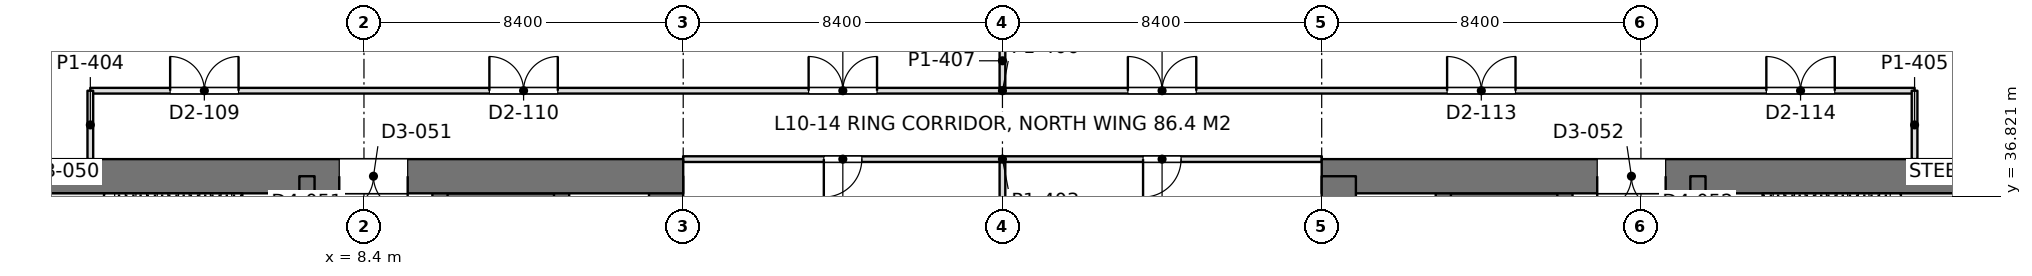
"""IFC4 building model, lengths in metres.
Left out: names, types, materials, properties, quantities, classifications, styles, units other than length and angle.
Written with IfcOpenShell. Run it as: python <this file> out.ifc"""

import sys

from ifc_helpers import new_model, si_unit, direction, frame, frame_2d, origin, place, context, subcontext, project, spatial, rectangle, extrude, element, fill, save


model = new_model("IFC4")
c1 = context("Model", 3, precision=1e-05, world=origin(), true_north=direction((0.0, 1.0)))
c2 = subcontext(c1, "Body", "Model", "MODEL_VIEW")
j1 = project(units=[si_unit("LENGTHUNIT", "METRE"), si_unit("PLANEANGLEUNIT", "RADIAN")], contexts=[c1])
p1 = place(None, origin())
s1 = spatial("IfcSite", under=j1, at=p1, CompositionType="ELEMENT")
p2 = place(p1, origin())
s2 = spatial("IfcBuilding", under=s1, at=p2, CompositionType="ELEMENT")
p3 = place(p2, frame((0.0, 0.0, 45.9)))
s3 = spatial("IfcBuildingStorey", under=s2, at=p3, CompositionType="ELEMENT", Elevation=45.9)
p4 = place(p3, frame((-1.2, 37.35, 0.0), z_axis=(0.0, 0.0, 1.0), x_axis=(1.0, 0.0, 0.0)))
e1 = element("IfcWall", 1, at=p4, inside=s3, PredefinedType="SHEAR", context=c2, shape_type="SweptSolid", body=[
    extrude(rectangle(XDim=18.0, YDim=0.9, at=frame_2d((9.0, 0.0))), origin(), (0.0, 0.0, 1.0), 4.5),
])
p5 = place(p4, frame((8.95, 0.0, 0.0)))
e2 = element("IfcOpeningElement", 2, at=p5, cuts=e1, PredefinedType="OPENING", context=c2, shape_type="SweptSolid", body=[
    extrude(rectangle(XDim=1.8, YDim=2.4, at=frame_2d((0.9, 1.2))), frame((0.0, 0.46, 0.0), z_axis=(0.0, -1.0, 0.0), x_axis=(1.0, 0.0, 0.0)), (0.0, 0.0, 1.0), 0.92),
])
p6 = place(p3, frame((16.35, 13.05, 0.0), z_axis=(0.0, 0.0, 1.0), x_axis=(0.0, 1.0, 0.0)))
e3 = element("IfcWall", 3, at=p6, inside=s3, PredefinedType="SHEAR", context=c2, shape_type="SweptSolid", body=[
    extrude(rectangle(XDim=24.3, YDim=0.9, at=frame_2d((12.15, 0.0))), origin(), (0.0, 0.0, 1.0), 4.5),
])
p7 = place(p3, frame((6.9, 13.05, 0.0), z_axis=(0.0, 0.0, 1.0), x_axis=(0.0, 1.0, 0.0)))
e4 = element("IfcWall", 4, at=p7, inside=s3, PredefinedType="SHEAR", context=c2, shape_type="SweptSolid", body=[
    extrude(rectangle(XDim=24.3, YDim=0.4, at=frame_2d((12.15, 0.0))), origin(), (0.0, 0.0, 1.0), 4.5),
])
p8 = place(p7, frame((1.3, 0.0, 0.0)))
e5 = element("IfcOpeningElement", 5, at=p8, cuts=e4, PredefinedType="OPENING", context=c2, shape_type="SweptSolid", body=[
    extrude(rectangle(XDim=1.0, YDim=2.2, at=frame_2d((0.5, 1.1))), frame((0.0, 0.21, 0.0), z_axis=(0.0, -1.0, 0.0), x_axis=(1.0, 0.0, 0.0)), (0.0, 0.0, 1.0), 0.42),
])
p9 = place(p7, frame((22.0, 0.0, 0.0)))
e6 = element("IfcOpeningElement", 6, at=p9, cuts=e4, PredefinedType="OPENING", context=c2, shape_type="SweptSolid", body=[
    extrude(rectangle(XDim=1.0, YDim=2.2, at=frame_2d((0.5, 1.1))), frame((0.0, 0.21, 0.0), z_axis=(0.0, -1.0, 0.0), x_axis=(1.0, 0.0, 0.0)), (0.0, 0.0, 1.0), 0.42),
])
p10 = place(p7, frame((5.55, 0.0, 0.0)))
e7 = element("IfcOpeningElement", 7, at=p10, cuts=e4, PredefinedType="OPENING", context=c2, shape_type="SweptSolid", body=[
    extrude(rectangle(XDim=1.0, YDim=2.2, at=frame_2d((0.5, 1.1))), frame((0.0, 0.21, 0.0), z_axis=(0.0, -1.0, 0.0), x_axis=(1.0, 0.0, 0.0)), (0.0, 0.0, 1.0), 0.42),
])
p11 = place(p7, frame((9.55, 0.0, 0.0)))
e8 = element("IfcOpeningElement", 8, at=p11, cuts=e4, PredefinedType="OPENING", context=c2, shape_type="SweptSolid", body=[
    extrude(rectangle(XDim=1.0, YDim=2.2, at=frame_2d((0.5, 1.1))), frame((0.0, 0.21, 0.0), z_axis=(0.0, -1.0, 0.0), x_axis=(1.0, 0.0, 0.0)), (0.0, 0.0, 1.0), 0.42),
])
p12 = place(p7, frame((12.8, 0.0, 0.0)))
e9 = element("IfcOpeningElement", 9, at=p12, cuts=e4, PredefinedType="OPENING", context=c2, shape_type="SweptSolid", body=[
    extrude(rectangle(XDim=1.1, YDim=2.2, at=frame_2d((0.55, 1.1))), frame((0.0, 0.21, 0.0), z_axis=(0.0, -1.0, 0.0), x_axis=(1.0, 0.0, 0.0)), (0.0, 0.0, 1.0), 0.42),
])
p13 = place(p7, frame((15.538, 0.0, 0.0)))
e10 = element("IfcOpeningElement", 10, at=p13, cuts=e4, PredefinedType="OPENING", context=c2, shape_type="SweptSolid", body=[
    extrude(rectangle(XDim=1.1, YDim=2.2, at=frame_2d((0.55, 1.1))), frame((0.0, 0.21, 0.0), z_axis=(0.0, -1.0, 0.0), x_axis=(1.0, 0.0, 0.0)), (0.0, 0.0, 1.0), 0.42),
])
p14 = place(p7, frame((18.262, 0.0, 0.0)))
e11 = element("IfcOpeningElement", 11, at=p14, cuts=e4, PredefinedType="OPENING", context=c2, shape_type="SweptSolid", body=[
    extrude(rectangle(XDim=1.1, YDim=2.2, at=frame_2d((0.55, 1.1))), frame((0.0, 0.21, 0.0), z_axis=(0.0, -1.0, 0.0), x_axis=(1.0, 0.0, 0.0)), (0.0, 0.0, 1.0), 0.42),
])
p15 = place(p3, frame((10.4, 13.05, 0.0), z_axis=(0.0, 0.0, 1.0), x_axis=(0.0, 1.0, 0.0)))
e12 = element("IfcWall", 12, at=p15, inside=s3, PredefinedType="SHEAR", context=c2, shape_type="SweptSolid", body=[
    extrude(rectangle(XDim=24.3, YDim=0.4, at=frame_2d((12.15, 0.0))), origin(), (0.0, 0.0, 1.0), 4.5),
])
p16 = place(p15, frame((1.5, 0.0, 0.0)))
e13 = element("IfcOpeningElement", 13, at=p16, cuts=e12, PredefinedType="OPENING", context=c2, shape_type="SweptSolid", body=[
    extrude(rectangle(XDim=1.1, YDim=2.2, at=frame_2d((0.55, 1.1))), frame((0.0, 0.21, 0.0), z_axis=(0.0, -1.0, 0.0), x_axis=(1.0, 0.0, 0.0)), (0.0, 0.0, 1.0), 0.42),
])
p17 = place(p15, frame((4.35, 0.0, 0.0)))
e14 = element("IfcOpeningElement", 14, at=p17, cuts=e12, PredefinedType="OPENING", context=c2, shape_type="SweptSolid", body=[
    extrude(rectangle(XDim=1.1, YDim=2.2, at=frame_2d((0.55, 1.1))), frame((0.0, 0.21, 0.0), z_axis=(0.0, -1.0, 0.0), x_axis=(1.0, 0.0, 0.0)), (0.0, 0.0, 1.0), 0.42),
])
p18 = place(p15, frame((7.2, 0.0, 0.0)))
e15 = element("IfcOpeningElement", 15, at=p18, cuts=e12, PredefinedType="OPENING", context=c2, shape_type="SweptSolid", body=[
    extrude(rectangle(XDim=1.1, YDim=2.2, at=frame_2d((0.55, 1.1))), frame((0.0, 0.21, 0.0), z_axis=(0.0, -1.0, 0.0), x_axis=(1.0, 0.0, 0.0)), (0.0, 0.0, 1.0), 0.42),
])
p19 = place(p15, frame((21.45, 0.0, 0.0)))
e16 = element("IfcOpeningElement", 16, at=p19, cuts=e12, PredefinedType="OPENING", context=c2, shape_type="SweptSolid", body=[
    extrude(rectangle(XDim=1.1, YDim=2.2, at=frame_2d((0.55, 1.1))), frame((0.0, 0.21, 0.0), z_axis=(0.0, -1.0, 0.0), x_axis=(1.0, 0.0, 0.0)), (0.0, 0.0, 1.0), 0.42),
])
p20 = place(p3, frame((13.6, 13.05, 0.0), z_axis=(0.0, 0.0, 1.0), x_axis=(0.0, 1.0, 0.0)))
e17 = element("IfcWall", 17, at=p20, inside=s3, PredefinedType="SHEAR", context=c2, shape_type="SweptSolid", body=[
    extrude(rectangle(XDim=24.3, YDim=0.4, at=frame_2d((12.15, 0.0))), origin(), (0.0, 0.0, 1.0), 4.5),
])
p21 = place(p3, frame((10.4, 36.625, 0.0), z_axis=(0.0, 0.0, 1.0), x_axis=(1.0, 0.0, 0.0)))
e18 = element("IfcWall", 18, at=p21, inside=s3, PredefinedType="SHEAR", context=c2, shape_type="SweptSolid", body=[
    extrude(rectangle(XDim=3.2, YDim=0.55, at=frame_2d((1.6, 0.0))), origin(), (0.0, 0.0, 1.0), 4.5),
])
p22 = place(p3, frame((33.6, 37.35, 0.0), z_axis=(0.0, 0.0, 1.0), x_axis=(1.0, 0.0, 0.0)))
e19 = element("IfcWall", 19, at=p22, inside=s3, PredefinedType="SHEAR", context=c2, shape_type="SweptSolid", body=[
    extrude(rectangle(XDim=18.0, YDim=0.9, at=frame_2d((9.0, 0.0))), origin(), (0.0, 0.0, 1.0), 4.5),
])
p23 = place(p22, frame((7.25, 0.0, 0.0)))
e20 = element("IfcOpeningElement", 20, at=p23, cuts=e19, PredefinedType="OPENING", context=c2, shape_type="SweptSolid", body=[
    extrude(rectangle(XDim=1.8, YDim=2.4, at=frame_2d((0.9, 1.2))), frame((0.0, 0.46, 0.0), z_axis=(0.0, -1.0, 0.0), x_axis=(1.0, 0.0, 0.0)), (0.0, 0.0, 1.0), 0.92),
])
p24 = place(p3, frame((34.05, 13.05, 0.0), z_axis=(0.0, 0.0, 1.0), x_axis=(0.0, 1.0, 0.0)))
e21 = element("IfcWall", 21, at=p24, inside=s3, PredefinedType="SHEAR", context=c2, shape_type="SweptSolid", body=[
    extrude(rectangle(XDim=24.3, YDim=0.9, at=frame_2d((12.15, 0.0))), origin(), (0.0, 0.0, 1.0), 4.5),
])
p25 = place(p3, frame((43.5, 13.05, 0.0), z_axis=(0.0, 0.0, 1.0), x_axis=(0.0, 1.0, 0.0)))
e22 = element("IfcWall", 22, at=p25, inside=s3, PredefinedType="SHEAR", context=c2, shape_type="SweptSolid", body=[
    extrude(rectangle(XDim=24.3, YDim=0.4, at=frame_2d((12.15, 0.0))), origin(), (0.0, 0.0, 1.0), 4.5),
])
p26 = place(p25, frame((1.3, 0.0, 0.0)))
e23 = element("IfcOpeningElement", 23, at=p26, cuts=e22, PredefinedType="OPENING", context=c2, shape_type="SweptSolid", body=[
    extrude(rectangle(XDim=1.0, YDim=2.2, at=frame_2d((0.5, 1.1))), frame((0.0, 0.21, 0.0), z_axis=(0.0, -1.0, 0.0), x_axis=(1.0, 0.0, 0.0)), (0.0, 0.0, 1.0), 0.42),
])
p27 = place(p25, frame((22.0, 0.0, 0.0)))
e24 = element("IfcOpeningElement", 24, at=p27, cuts=e22, PredefinedType="OPENING", context=c2, shape_type="SweptSolid", body=[
    extrude(rectangle(XDim=1.0, YDim=2.2, at=frame_2d((0.5, 1.1))), frame((0.0, 0.21, 0.0), z_axis=(0.0, -1.0, 0.0), x_axis=(1.0, 0.0, 0.0)), (0.0, 0.0, 1.0), 0.42),
])
p28 = place(p25, frame((5.55, 0.0, 0.0)))
e25 = element("IfcOpeningElement", 25, at=p28, cuts=e22, PredefinedType="OPENING", context=c2, shape_type="SweptSolid", body=[
    extrude(rectangle(XDim=1.0, YDim=2.2, at=frame_2d((0.5, 1.1))), frame((0.0, 0.21, 0.0), z_axis=(0.0, -1.0, 0.0), x_axis=(1.0, 0.0, 0.0)), (0.0, 0.0, 1.0), 0.42),
])
p29 = place(p25, frame((9.55, 0.0, 0.0)))
e26 = element("IfcOpeningElement", 26, at=p29, cuts=e22, PredefinedType="OPENING", context=c2, shape_type="SweptSolid", body=[
    extrude(rectangle(XDim=1.0, YDim=2.2, at=frame_2d((0.5, 1.1))), frame((0.0, 0.21, 0.0), z_axis=(0.0, -1.0, 0.0), x_axis=(1.0, 0.0, 0.0)), (0.0, 0.0, 1.0), 0.42),
])
p30 = place(p25, frame((12.8, 0.0, 0.0)))
e27 = element("IfcOpeningElement", 27, at=p30, cuts=e22, PredefinedType="OPENING", context=c2, shape_type="SweptSolid", body=[
    extrude(rectangle(XDim=1.1, YDim=2.2, at=frame_2d((0.55, 1.1))), frame((0.0, 0.21, 0.0), z_axis=(0.0, -1.0, 0.0), x_axis=(1.0, 0.0, 0.0)), (0.0, 0.0, 1.0), 0.42),
])
p31 = place(p25, frame((15.538, 0.0, 0.0)))
e28 = element("IfcOpeningElement", 28, at=p31, cuts=e22, PredefinedType="OPENING", context=c2, shape_type="SweptSolid", body=[
    extrude(rectangle(XDim=1.1, YDim=2.2, at=frame_2d((0.55, 1.1))), frame((0.0, 0.21, 0.0), z_axis=(0.0, -1.0, 0.0), x_axis=(1.0, 0.0, 0.0)), (0.0, 0.0, 1.0), 0.42),
])
p32 = place(p25, frame((18.262, 0.0, 0.0)))
e29 = element("IfcOpeningElement", 29, at=p32, cuts=e22, PredefinedType="OPENING", context=c2, shape_type="SweptSolid", body=[
    extrude(rectangle(XDim=1.1, YDim=2.2, at=frame_2d((0.55, 1.1))), frame((0.0, 0.21, 0.0), z_axis=(0.0, -1.0, 0.0), x_axis=(1.0, 0.0, 0.0)), (0.0, 0.0, 1.0), 0.42),
])
p33 = place(p3, frame((40.0, 13.05, 0.0), z_axis=(0.0, 0.0, 1.0), x_axis=(0.0, 1.0, 0.0)))
e30 = element("IfcWall", 30, at=p33, inside=s3, PredefinedType="SHEAR", context=c2, shape_type="SweptSolid", body=[
    extrude(rectangle(XDim=24.3, YDim=0.4, at=frame_2d((12.15, 0.0))), origin(), (0.0, 0.0, 1.0), 4.5),
])
p34 = place(p33, frame((1.5, 0.0, 0.0)))
e31 = element("IfcOpeningElement", 31, at=p34, cuts=e30, PredefinedType="OPENING", context=c2, shape_type="SweptSolid", body=[
    extrude(rectangle(XDim=1.1, YDim=2.2, at=frame_2d((0.55, 1.1))), frame((0.0, 0.21, 0.0), z_axis=(0.0, -1.0, 0.0), x_axis=(1.0, 0.0, 0.0)), (0.0, 0.0, 1.0), 0.42),
])
p35 = place(p33, frame((4.35, 0.0, 0.0)))
e32 = element("IfcOpeningElement", 32, at=p35, cuts=e30, PredefinedType="OPENING", context=c2, shape_type="SweptSolid", body=[
    extrude(rectangle(XDim=1.1, YDim=2.2, at=frame_2d((0.55, 1.1))), frame((0.0, 0.21, 0.0), z_axis=(0.0, -1.0, 0.0), x_axis=(1.0, 0.0, 0.0)), (0.0, 0.0, 1.0), 0.42),
])
p36 = place(p33, frame((7.2, 0.0, 0.0)))
e33 = element("IfcOpeningElement", 33, at=p36, cuts=e30, PredefinedType="OPENING", context=c2, shape_type="SweptSolid", body=[
    extrude(rectangle(XDim=1.1, YDim=2.2, at=frame_2d((0.55, 1.1))), frame((0.0, 0.21, 0.0), z_axis=(0.0, -1.0, 0.0), x_axis=(1.0, 0.0, 0.0)), (0.0, 0.0, 1.0), 0.42),
])
p37 = place(p33, frame((21.45, 0.0, 0.0)))
e34 = element("IfcOpeningElement", 34, at=p37, cuts=e30, PredefinedType="OPENING", context=c2, shape_type="SweptSolid", body=[
    extrude(rectangle(XDim=1.1, YDim=2.2, at=frame_2d((0.55, 1.1))), frame((0.0, 0.21, 0.0), z_axis=(0.0, -1.0, 0.0), x_axis=(1.0, 0.0, 0.0)), (0.0, 0.0, 1.0), 0.42),
])
p38 = place(p3, frame((36.8, 13.05, 0.0), z_axis=(0.0, 0.0, 1.0), x_axis=(0.0, 1.0, 0.0)))
e35 = element("IfcWall", 35, at=p38, inside=s3, PredefinedType="SHEAR", context=c2, shape_type="SweptSolid", body=[
    extrude(rectangle(XDim=24.3, YDim=0.4, at=frame_2d((12.15, 0.0))), origin(), (0.0, 0.0, 1.0), 4.5),
])
p39 = place(p3, frame((40.0, 36.625, 0.0), z_axis=(0.0, 0.0, 1.0), x_axis=(-1.0, 0.0, 0.0)))
e36 = element("IfcWall", 36, at=p39, inside=s3, PredefinedType="SHEAR", context=c2, shape_type="SweptSolid", body=[
    extrude(rectangle(XDim=3.2, YDim=0.55, at=frame_2d((1.6, 0.0))), origin(), (0.0, 0.0, 1.0), 4.5),
])
p40 = place(p3, frame((25.2, 39.674, 0.0), z_axis=(0.0, 0.0, 1.0), x_axis=(0.0, 1.0, 0.0)))
e37 = element("IfcWall", 37, at=p40, inside=s3, PredefinedType="PARTITIONING", context=c2, shape_type="SweptSolid", body=[
    extrude(rectangle(XDim=1.427, YDim=0.15, at=frame_2d((0.713, 0.0))), origin(), (0.0, 0.0, 1.0), 3.74),
])
p41 = place(p3, frame((1.2, 39.6, 0.0), z_axis=(0.0, 0.0, 1.0), x_axis=(1.0, 0.0, 0.0)))
e38 = element("IfcWall", 38, at=p41, inside=s3, PredefinedType="PARTITIONING", context=c2, shape_type="SweptSolid", body=[
    extrude(rectangle(XDim=48.0, YDim=0.15, at=frame_2d((24.0, 0.0))), origin(), (0.0, 0.0, 1.0), 3.74),
])
p42 = place(p41, frame((2.1, 0.0, 0.0)))
e39 = element("IfcOpeningElement", 39, at=p42, cuts=e38, PredefinedType="OPENING", context=c2, shape_type="SweptSolid", body=[
    extrude(rectangle(XDim=1.8, YDim=2.2, at=frame_2d((0.9, 1.1))), frame((0.0, 0.085, 0.0), z_axis=(0.0, -1.0, 0.0), x_axis=(1.0, 0.0, 0.0)), (0.0, 0.0, 1.0), 0.17),
])
p43 = place(p41, frame((10.5, 0.0, 0.0)))
e40 = element("IfcOpeningElement", 40, at=p43, cuts=e38, PredefinedType="OPENING", context=c2, shape_type="SweptSolid", body=[
    extrude(rectangle(XDim=1.8, YDim=2.2, at=frame_2d((0.9, 1.1))), frame((0.0, 0.085, 0.0), z_axis=(0.0, -1.0, 0.0), x_axis=(1.0, 0.0, 0.0)), (0.0, 0.0, 1.0), 0.17),
])
p44 = place(p41, frame((18.9, 0.0, 0.0)))
e41 = element("IfcOpeningElement", 41, at=p44, cuts=e38, PredefinedType="OPENING", context=c2, shape_type="SweptSolid", body=[
    extrude(rectangle(XDim=1.8, YDim=2.2, at=frame_2d((0.9, 1.1))), frame((0.0, 0.085, 0.0), z_axis=(0.0, -1.0, 0.0), x_axis=(1.0, 0.0, 0.0)), (0.0, 0.0, 1.0), 0.17),
])
p45 = place(p41, frame((27.3, 0.0, 0.0)))
e42 = element("IfcOpeningElement", 42, at=p45, cuts=e38, PredefinedType="OPENING", context=c2, shape_type="SweptSolid", body=[
    extrude(rectangle(XDim=1.8, YDim=2.2, at=frame_2d((0.9, 1.1))), frame((0.0, 0.085, 0.0), z_axis=(0.0, -1.0, 0.0), x_axis=(1.0, 0.0, 0.0)), (0.0, 0.0, 1.0), 0.17),
])
p46 = place(p41, frame((35.7, 0.0, 0.0)))
e43 = element("IfcOpeningElement", 43, at=p46, cuts=e38, PredefinedType="OPENING", context=c2, shape_type="SweptSolid", body=[
    extrude(rectangle(XDim=1.8, YDim=2.2, at=frame_2d((0.9, 1.1))), frame((0.0, 0.085, 0.0), z_axis=(0.0, -1.0, 0.0), x_axis=(1.0, 0.0, 0.0)), (0.0, 0.0, 1.0), 0.17),
])
p47 = place(p41, frame((44.1, 0.0, 0.0)))
e44 = element("IfcOpeningElement", 44, at=p47, cuts=e38, PredefinedType="OPENING", context=c2, shape_type="SweptSolid", body=[
    extrude(rectangle(XDim=1.8, YDim=2.2, at=frame_2d((0.9, 1.1))), frame((0.0, 0.085, 0.0), z_axis=(0.0, -1.0, 0.0), x_axis=(1.0, 0.0, 0.0)), (0.0, 0.0, 1.0), 0.17),
])
for number, where, z_axis, x_axis in (
    (45, (1.2, 37.8, 0.0), (0.0, 0.0, 1.0), (0.0, 1.0, 0.0)),
    (46, (49.2, 37.8, 0.0), (0.0, 0.0, 1.0), (0.0, 1.0, 0.0)),
):
    element("IfcWall", number, at=place(p3, frame(where, z_axis=z_axis, x_axis=x_axis)), inside=s3, PredefinedType="PARTITIONING", context=c2, shape_type="SweptSolid", body=[
        extrude(rectangle(XDim=1.8, YDim=0.15, at=frame_2d((0.9, 0.0))), origin(), (0.0, 0.0, 1.0), 4.34),
    ])
p48 = place(p3, frame((16.798, 37.8, 0.0), z_axis=(0.0, 0.0, 1.0), x_axis=(1.0, 0.0, 0.0)))
e47 = element("IfcWall", 47, at=p48, inside=s3, PredefinedType="PARTITIONING", context=c2, shape_type="SweptSolid", body=[
    extrude(rectangle(XDim=16.804, YDim=0.15, at=frame_2d((8.402, 0.0))), origin(), (0.0, 0.0, 1.0), 3.74),
])
p49 = place(p48, frame((3.702, 0.0, 0.0)))
e48 = element("IfcOpeningElement", 48, at=p49, cuts=e47, PredefinedType="OPENING", context=c2, shape_type="SweptSolid", body=[
    extrude(rectangle(XDim=1.0, YDim=2.2, at=frame_2d((0.5, 1.1))), frame((0.0, 0.085, 0.0), z_axis=(0.0, -1.0, 0.0), x_axis=(1.0, 0.0, 0.0)), (0.0, 0.0, 1.0), 0.17),
])
p50 = place(p48, frame((12.102, 0.0, 0.0)))
e49 = element("IfcOpeningElement", 49, at=p50, cuts=e47, PredefinedType="OPENING", context=c2, shape_type="SweptSolid", body=[
    extrude(rectangle(XDim=1.0, YDim=2.2, at=frame_2d((0.5, 1.1))), frame((0.0, 0.085, 0.0), z_axis=(0.0, -1.0, 0.0), x_axis=(1.0, 0.0, 0.0)), (0.0, 0.0, 1.0), 0.17),
])
p51 = place(p3, frame((25.2, 34.199, 0.0), z_axis=(0.0, 0.0, 1.0), x_axis=(0.0, 1.0, 0.0)))
e50 = element("IfcWall", 50, at=p51, inside=s3, PredefinedType="PARTITIONING", context=c2, shape_type="SweptSolid", body=[
    extrude(rectangle(XDim=3.527, YDim=0.15, at=frame_2d((1.764, 0.0))), origin(), (0.0, 0.0, 1.0), 3.74),
])
p52 = place(p5, frame((1.8, 0.0, 0.0), z_axis=(0.0, 0.0, 1.0), x_axis=(-1.0, 0.0, 0.0)))
e51 = element("IfcDoor", 51, at=p52, inside=s3, OperationType="DOUBLE_DOOR_SINGLE_SWING", PredefinedType="DOOR", context=c2, shape_type="SweptSolid", body=[
    extrude(rectangle(XDim=1.8, YDim=2.4, at=frame_2d((0.9, 1.2))), frame((0.0, 0.025, 0.0), z_axis=(0.0, -1.0, 0.0), x_axis=(1.0, 0.0, 0.0)), (0.0, 0.0, 1.0), 0.05),
])
fill(e2, e51)
p53 = place(p23, frame((1.8, 0.0, 0.0), z_axis=(0.0, 0.0, 1.0), x_axis=(-1.0, 0.0, 0.0)))
e52 = element("IfcDoor", 52, at=p53, inside=s3, OperationType="DOUBLE_DOOR_SINGLE_SWING", PredefinedType="DOOR", context=c2, shape_type="SweptSolid", body=[
    extrude(rectangle(XDim=1.8, YDim=2.4, at=frame_2d((0.9, 1.2))), frame((0.0, 0.025, 0.0), z_axis=(0.0, -1.0, 0.0), x_axis=(1.0, 0.0, 0.0)), (0.0, 0.0, 1.0), 0.05),
])
fill(e20, e52)
p54 = place(p42, origin())
e53 = element("IfcDoor", 53, at=p54, inside=s3, OperationType="DOUBLE_DOOR_SINGLE_SWING", PredefinedType="DOOR", context=c2, shape_type="SweptSolid", body=[
    extrude(rectangle(XDim=1.8, YDim=2.2, at=frame_2d((0.9, 1.1))), frame((0.0, 0.025, 0.0), z_axis=(0.0, -1.0, 0.0), x_axis=(1.0, 0.0, 0.0)), (0.0, 0.0, 1.0), 0.05),
])
fill(e39, e53)
p55 = place(p43, origin())
e54 = element("IfcDoor", 54, at=p55, inside=s3, OperationType="DOUBLE_DOOR_SINGLE_SWING", PredefinedType="DOOR", context=c2, shape_type="SweptSolid", body=[
    extrude(rectangle(XDim=1.8, YDim=2.2, at=frame_2d((0.9, 1.1))), frame((0.0, 0.025, 0.0), z_axis=(0.0, -1.0, 0.0), x_axis=(1.0, 0.0, 0.0)), (0.0, 0.0, 1.0), 0.05),
])
fill(e40, e54)
p56 = place(p44, origin())
e55 = element("IfcDoor", 55, at=p56, inside=s3, OperationType="DOUBLE_DOOR_SINGLE_SWING", PredefinedType="DOOR", context=c2, shape_type="SweptSolid", body=[
    extrude(rectangle(XDim=1.8, YDim=2.2, at=frame_2d((0.9, 1.1))), frame((0.0, 0.025, 0.0), z_axis=(0.0, -1.0, 0.0), x_axis=(1.0, 0.0, 0.0)), (0.0, 0.0, 1.0), 0.05),
])
fill(e41, e55)
p57 = place(p45, origin())
e56 = element("IfcDoor", 56, at=p57, inside=s3, OperationType="DOUBLE_DOOR_SINGLE_SWING", PredefinedType="DOOR", context=c2, shape_type="SweptSolid", body=[
    extrude(rectangle(XDim=1.8, YDim=2.2, at=frame_2d((0.9, 1.1))), frame((0.0, 0.025, 0.0), z_axis=(0.0, -1.0, 0.0), x_axis=(1.0, 0.0, 0.0)), (0.0, 0.0, 1.0), 0.05),
])
fill(e42, e56)
p58 = place(p46, origin())
e57 = element("IfcDoor", 57, at=p58, inside=s3, OperationType="DOUBLE_DOOR_SINGLE_SWING", PredefinedType="DOOR", context=c2, shape_type="SweptSolid", body=[
    extrude(rectangle(XDim=1.8, YDim=2.2, at=frame_2d((0.9, 1.1))), frame((0.0, 0.025, 0.0), z_axis=(0.0, -1.0, 0.0), x_axis=(1.0, 0.0, 0.0)), (0.0, 0.0, 1.0), 0.05),
])
fill(e43, e57)
p59 = place(p47, origin())
e58 = element("IfcDoor", 58, at=p59, inside=s3, OperationType="DOUBLE_DOOR_SINGLE_SWING", PredefinedType="DOOR", context=c2, shape_type="SweptSolid", body=[
    extrude(rectangle(XDim=1.8, YDim=2.2, at=frame_2d((0.9, 1.1))), frame((0.0, 0.025, 0.0), z_axis=(0.0, -1.0, 0.0), x_axis=(1.0, 0.0, 0.0)), (0.0, 0.0, 1.0), 0.05),
])
fill(e44, e58)
p60 = place(p49, frame((1.0, 0.0, 0.0), z_axis=(0.0, 0.0, 1.0), x_axis=(-1.0, 0.0, 0.0)))
e59 = element("IfcDoor", 59, at=p60, inside=s3, OperationType="SINGLE_SWING_RIGHT", PredefinedType="DOOR", context=c2, shape_type="SweptSolid", body=[
    extrude(rectangle(XDim=1.0, YDim=2.2, at=frame_2d((0.5, 1.1))), frame((0.0, 0.025, 0.0), z_axis=(0.0, -1.0, 0.0), x_axis=(1.0, 0.0, 0.0)), (0.0, 0.0, 1.0), 0.05),
])
fill(e48, e59)
p61 = place(p50, frame((1.0, 0.0, 0.0), z_axis=(0.0, 0.0, 1.0), x_axis=(-1.0, 0.0, 0.0)))
e60 = element("IfcDoor", 60, at=p61, inside=s3, OperationType="SINGLE_SWING_RIGHT", PredefinedType="DOOR", context=c2, shape_type="SweptSolid", body=[
    extrude(rectangle(XDim=1.0, YDim=2.2, at=frame_2d((0.5, 1.1))), frame((0.0, 0.025, 0.0), z_axis=(0.0, -1.0, 0.0), x_axis=(1.0, 0.0, 0.0)), (0.0, 0.0, 1.0), 0.05),
])
fill(e49, e60)
save(model, sys.argv[1])
